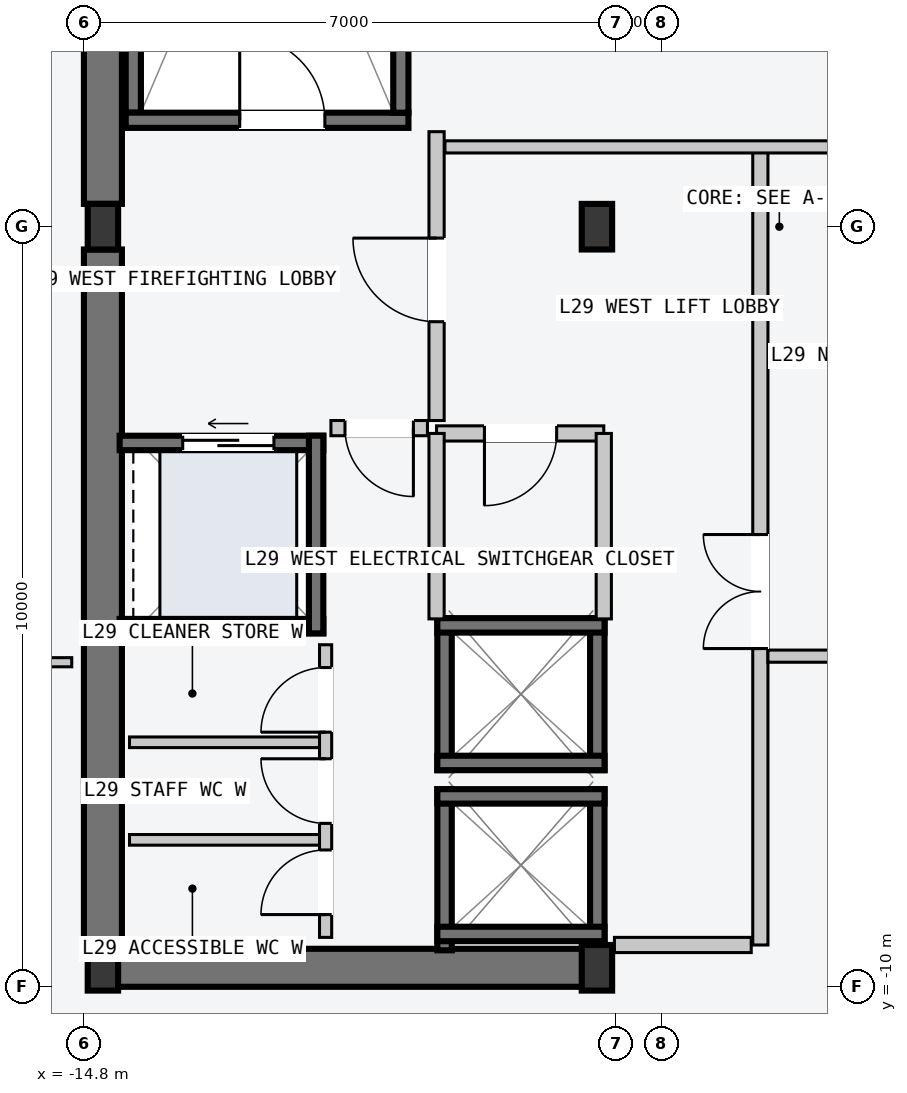
"""IFC4 building model, lengths in metres.
Left out: names, types, materials, properties, quantities, classifications, styles, units other than length and angle.
Written with IfcOpenShell. Run it as: python <this file> out.ifc"""

import sys

from ifc_helpers import new_model, si_unit, direction, frame, frame_2d, origin, origin_2d, place, context, subcontext, project, spatial, rectangle, i_section, extrude, element, fill, save


model = new_model("IFC4")
c1 = context("Model", 3, precision=1e-05, world=origin(), true_north=direction((0.0, 1.0)))
c2 = subcontext(c1, "Body", "Model", "MODEL_VIEW")
j1 = project(units=[si_unit("LENGTHUNIT", "METRE"), si_unit("PLANEANGLEUNIT", "RADIAN")], contexts=[c1])
p1 = place(None, origin())
s1 = spatial("IfcSite", under=j1, at=p1, CompositionType="ELEMENT")
p2 = place(p1, origin())
s2 = spatial("IfcBuilding", under=s1, at=p2, CompositionType="ELEMENT")
p3 = place(p2, frame((0.0, 0.0, 113.4)))
s3 = spatial("IfcBuildingStorey", under=s2, at=p3, CompositionType="ELEMENT", Elevation=113.4)
p4 = place(p3, frame((-14.53, -9.75, -0.2), z_axis=(0.0, 0.0, 1.0), x_axis=(1.0, 0.0, 0.0)))
e1 = element("IfcWall", 1, at=p4, inside=s3, PredefinedType="SHEAR", context=c2, shape_type="SweptSolid", body=[
    extrude(rectangle(XDim=6.46, YDim=0.5, at=frame_2d((3.23, 0.0))), origin(), (0.0, 0.0, 1.0), 3.6),
])
for number, where, z_axis, x_axis in (
    (2, (-14.55, -9.45, -0.2), (0.0, 0.0, 1.0), (0.0, 1.0, 0.0)),
    (3, (-14.55, 0.3, -0.2), (0.0, 0.0, 1.0), (0.0, 1.0, 0.0)),
):
    element("IfcWall", number, at=place(p3, frame(where, z_axis=z_axis, x_axis=x_axis)), inside=s3, PredefinedType="SHEAR", context=c2, shape_type="SweptSolid", body=[
        extrude(rectangle(XDim=9.15, YDim=0.5, at=frame_2d((4.575, 0.0))), origin(), (0.0, 0.0, 1.0), 3.6),
    ])
p5 = place(p3, frame((-14.15, 1.5, -0.2), z_axis=(0.0, 0.0, 1.0), x_axis=(0.0, 1.0, 0.0)))
e4 = element("IfcWall", 4, at=p5, inside=s3, PredefinedType="SOLIDWALL", context=c2, shape_type="SweptSolid", body=[
    extrude(rectangle(XDim=7.8, YDim=0.2, at=frame_2d((3.9, 0.0))), origin(), (0.0, 0.0, 1.0), 3.6),
])
p6 = place(p3, frame((-14.25, 1.4, -0.2), z_axis=(0.0, 0.0, 1.0), x_axis=(1.0, 0.0, 0.0)))
e5 = element("IfcWall", 5, at=p6, inside=s3, PredefinedType="SOLIDWALL", context=c2, shape_type="SweptSolid", body=[
    extrude(rectangle(XDim=3.72, YDim=0.2, at=frame_2d((1.86, 0.0))), origin(), (0.0, 0.0, 1.0), 3.6),
])
p7 = place(p6, frame((1.5, 0.0, 0.2)))
e6 = element("IfcOpeningElement", 6, at=p7, cuts=e5, PredefinedType="OPENING", context=c2, shape_type="SweptSolid", body=[
    extrude(rectangle(XDim=1.12, YDim=2.18, at=frame_2d((0.56, 1.09))), frame((0.0, 0.11, 0.0), z_axis=(0.0, -1.0, 0.0), x_axis=(1.0, 0.0, 0.0)), (0.0, 0.0, 1.0), 0.22),
])
p8 = place(p3, frame((-10.63, 1.5, -0.2), z_axis=(0.0, 0.0, 1.0), x_axis=(0.0, 1.0, 0.0)))
e7 = element("IfcWall", 7, at=p8, inside=s3, PredefinedType="SOLIDWALL", context=c2, shape_type="SweptSolid", body=[
    extrude(rectangle(XDim=7.8, YDim=0.2, at=frame_2d((3.9, 0.0))), origin(), (0.0, 0.0, 1.0), 3.6),
])
for number, where, z_axis, x_axis in (
    (8, (-14.55, -9.75, 0.0), (0.0, 0.0, 1.0), (1.0, 0.0, 0.0)),
    (9, (-14.55, 0.0, 0.0), (0.0, 0.0, 1.0), (1.0, 0.0, 0.0)),
    (10, (-8.05, -9.75, 0.0), (0.0, 0.0, 1.0), (1.0, 0.0, 0.0)),
    (11, (-8.05, 0.0, 0.0), (0.0, 0.0, 1.0), (1.0, 0.0, 0.0)),
):
    element("IfcColumn", number, at=place(p3, frame(where, z_axis=z_axis, x_axis=x_axis)), inside=s3, PredefinedType="COLUMN", context=c2, shape_type="SweptSolid", body=[
        extrude(i_section(OverallWidth=0.4, OverallDepth=0.6, WebThickness=0.022, FlangeThickness=0.036, at=origin_2d()), origin(), (0.0, 0.0, 1.0), 3.6),
    ])
for number, where, z_axis, x_axis in (
    (12, (-8.045, -9.52, -0.2), (0.0, 0.0, 1.0), (0.0, 1.0, 0.0)),
    (13, (-10.055, -9.52, -0.2), (0.0, 0.0, 1.0), (0.0, 1.0, 0.0)),
):
    element("IfcWall", number, at=place(p3, frame(where, z_axis=z_axis, x_axis=x_axis)), inside=s3, PredefinedType="SOLIDWALL", context=c2, shape_type="SweptSolid", body=[
        extrude(rectangle(XDim=2.12, YDim=0.19, at=frame_2d((1.06, 0.0))), origin(), (0.0, 0.0, 1.0), 3.6),
    ])
for number, where, z_axis, x_axis in (
    (14, (-10.15, -7.495, -0.2), (0.0, 0.0, 1.0), (1.0, 0.0, 0.0)),
    (15, (-10.15, -9.305, -0.2), (0.0, 0.0, 1.0), (1.0, 0.0, 0.0)),
):
    element("IfcWall", number, at=place(p3, frame(where, z_axis=z_axis, x_axis=x_axis)), inside=s3, PredefinedType="SOLIDWALL", context=c2, shape_type="SweptSolid", body=[
        extrude(rectangle(XDim=2.2, YDim=0.19, at=frame_2d((1.1, 0.0))), origin(), (0.0, 0.0, 1.0), 3.6),
    ])
for number, where, z_axis, x_axis in (
    (16, (-8.045, -7.15, -0.2), (0.0, 0.0, 1.0), (0.0, 1.0, 0.0)),
    (17, (-10.055, -7.15, -0.2), (0.0, 0.0, 1.0), (0.0, 1.0, 0.0)),
):
    element("IfcWall", number, at=place(p3, frame(where, z_axis=z_axis, x_axis=x_axis)), inside=s3, PredefinedType="SOLIDWALL", context=c2, shape_type="SweptSolid", body=[
        extrude(rectangle(XDim=2.0, YDim=0.19, at=frame_2d((1.0, 0.0))), origin(), (0.0, 0.0, 1.0), 3.6),
    ])
for number, where, z_axis, x_axis in (
    (18, (-10.15, -5.245, -0.2), (0.0, 0.0, 1.0), (1.0, 0.0, 0.0)),
    (19, (-10.15, -7.055, -0.2), (0.0, 0.0, 1.0), (1.0, 0.0, 0.0)),
):
    element("IfcWall", number, at=place(p3, frame(where, z_axis=z_axis, x_axis=x_axis)), inside=s3, PredefinedType="SOLIDWALL", context=c2, shape_type="SweptSolid", body=[
        extrude(rectangle(XDim=2.2, YDim=0.19, at=frame_2d((1.1, 0.0))), origin(), (0.0, 0.0, 1.0), 3.6),
    ])
p9 = place(p3, frame((-14.33, -2.845, -0.2), z_axis=(0.0, 0.0, 1.0), x_axis=(1.0, 0.0, 0.0)))
e20 = element("IfcWall", 20, at=p9, inside=s3, PredefinedType="SOLIDWALL", context=c2, shape_type="SweptSolid", body=[
    extrude(rectangle(XDim=2.68, YDim=0.19, at=frame_2d((1.34, 0.0))), origin(), (0.0, 0.0, 1.0), 3.6),
])
p10 = place(p9, frame((0.83, 0.0, 0.2)))
e21 = element("IfcOpeningElement", 21, at=p10, cuts=e20, PredefinedType="OPENING", context=c2, shape_type="SweptSolid", body=[
    extrude(rectangle(XDim=1.2, YDim=2.2, at=frame_2d((0.6, 1.1))), frame((0.0, 0.105, 0.0), z_axis=(0.0, -1.0, 0.0), x_axis=(1.0, 0.0, 0.0)), (0.0, 0.0, 1.0), 0.21),
])
p11 = place(p3, frame((-14.33, -5.255, -0.2), z_axis=(0.0, 0.0, 1.0), x_axis=(1.0, 0.0, 0.0)))
e22 = element("IfcWall", 22, at=p11, inside=s3, PredefinedType="SOLIDWALL", context=c2, shape_type="SweptSolid", body=[
    extrude(rectangle(XDim=2.68, YDim=0.19, at=frame_2d((1.34, 0.0))), origin(), (0.0, 0.0, 1.0), 3.6),
])
p12 = place(p3, frame((-11.745, -5.35, -0.2), z_axis=(0.0, 0.0, 1.0), x_axis=(0.0, 1.0, 0.0)))
e23 = element("IfcWall", 23, at=p12, inside=s3, PredefinedType="SOLIDWALL", context=c2, shape_type="SweptSolid", body=[
    extrude(rectangle(XDim=2.6, YDim=0.19, at=frame_2d((1.3, 0.0))), origin(), (0.0, 0.0, 1.0), 3.6),
])
p13 = place(p3, frame((-5.9, -9.45, 0.0), z_axis=(0.0, 0.0, 1.0), x_axis=(0.0, 1.0, 0.0)))
e24 = element("IfcWall", 24, at=p13, inside=s3, PredefinedType="PARTITIONING", context=c2, shape_type="SweptSolid", body=[
    extrude(rectangle(XDim=10.5, YDim=0.2, at=frame_2d((5.25, 0.0))), origin(), (0.0, 0.0, 1.0), 3.4),
])
p14 = place(p13, frame((3.9, 0.0, 0.0)))
e25 = element("IfcOpeningElement", 25, at=p14, cuts=e24, PredefinedType="OPENING", context=c2, shape_type="SweptSolid", body=[
    extrude(rectangle(XDim=1.5, YDim=2.2, at=frame_2d((0.75, 1.1))), frame((0.0, 0.11, 0.0), z_axis=(0.0, -1.0, 0.0), x_axis=(1.0, 0.0, 0.0)), (0.0, 0.0, 1.0), 0.22),
])
p15 = place(p3, frame((-6.02, -9.45, 0.0), z_axis=(0.0, 0.0, 1.0), x_axis=(-1.0, 0.0, 0.0)))
e26 = element("IfcWall", 26, at=p15, inside=s3, PredefinedType="PARTITIONING", context=c2, shape_type="SweptSolid", body=[
    extrude(rectangle(XDim=1.8, YDim=0.2, at=frame_2d((0.9, 0.0))), origin(), (0.0, 0.0, 1.0), 3.4),
])
p16 = place(p3, frame((-10.16, -2.55, 0.0), z_axis=(0.0, 0.0, 1.0), x_axis=(0.0, 1.0, 0.0)))
e27 = element("IfcWall", 27, at=p16, inside=s3, PredefinedType="PARTITIONING", context=c2, shape_type="SweptSolid", body=[
    extrude(rectangle(XDim=3.8, YDim=0.2, at=frame_2d((1.9, 0.0))), origin(), (0.0, 0.0, 1.0), 3.4),
])
p17 = place(p16, frame((1.3, 0.0, 0.0)))
e28 = element("IfcOpeningElement", 28, at=p17, cuts=e27, PredefinedType="OPENING", context=c2, shape_type="SweptSolid", body=[
    extrude(rectangle(XDim=1.1, YDim=2.15, at=frame_2d((0.55, 1.075))), frame((0.0, 0.11, 0.0), z_axis=(0.0, -1.0, 0.0), x_axis=(1.0, 0.0, 0.0)), (0.0, 0.0, 1.0), 0.22),
])
p18 = place(p3, frame((-10.28, -2.65, 0.0), z_axis=(0.0, 0.0, 1.0), x_axis=(-1.0, 0.0, 0.0)))
e29 = element("IfcWall", 29, at=p18, inside=s3, PredefinedType="PARTITIONING", context=c2, shape_type="SweptSolid", body=[
    extrude(rectangle(XDim=1.27, YDim=0.2, at=frame_2d((0.635, 0.0))), origin(), (0.0, 0.0, 1.0), 3.4),
])
p19 = place(p18, frame((0.185, 0.0, 0.0)))
e30 = element("IfcOpeningElement", 30, at=p19, cuts=e29, PredefinedType="OPENING", context=c2, shape_type="SweptSolid", body=[
    extrude(rectangle(XDim=0.9, YDim=2.15, at=frame_2d((0.45, 1.075))), frame((0.0, 0.11, 0.0), z_axis=(0.0, -1.0, 0.0), x_axis=(1.0, 0.0, 0.0)), (0.0, 0.0, 1.0), 0.22),
])
p20 = place(p3, frame((-7.96, -2.72, 0.0), z_axis=(0.0, 0.0, 1.0), x_axis=(-1.0, 0.0, 0.0)))
e31 = element("IfcWall", 31, at=p20, inside=s3, PredefinedType="PARTITIONING", context=c2, shape_type="SweptSolid", body=[
    extrude(rectangle(XDim=2.2, YDim=0.2, at=frame_2d((1.1, 0.0))), origin(), (0.0, 0.0, 1.0), 3.4),
])
p21 = place(p20, frame((0.62, 0.0, 0.0)))
e32 = element("IfcOpeningElement", 32, at=p21, cuts=e31, PredefinedType="OPENING", context=c2, shape_type="SweptSolid", body=[
    extrude(rectangle(XDim=0.95, YDim=2.1, at=frame_2d((0.475, 1.05))), frame((0.0, 0.11, 0.0), z_axis=(0.0, -1.0, 0.0), x_axis=(1.0, 0.0, 0.0)), (0.0, 0.0, 1.0), 0.22),
])
for number, where, z_axis, x_axis in (
    (33, (-7.96, -5.16, 0.0), (0.0, 0.0, 1.0), (0.0, 1.0, 0.0)),
    (34, (-10.16, -5.16, 0.0), (0.0, 0.0, 1.0), (0.0, 1.0, 0.0)),
):
    element("IfcWall", number, at=place(p3, frame(where, z_axis=z_axis, x_axis=x_axis)), inside=s3, PredefinedType="PARTITIONING", context=c2, shape_type="SweptSolid", body=[
        extrude(rectangle(XDim=2.44, YDim=0.2, at=frame_2d((1.22, 0.0))), origin(), (0.0, 0.0, 1.0), 3.4),
    ])
for number, where, z_axis, x_axis in (
    (35, (-11.7, -8.067, 0.0), (0.0, 0.0, 1.0), (-1.0, 0.0, 0.0)),
    (36, (-11.7, -6.783, 0.0), (0.0, 0.0, 1.0), (-1.0, 0.0, 0.0)),
):
    element("IfcWall", number, at=place(p3, frame(where, z_axis=z_axis, x_axis=x_axis)), inside=s3, PredefinedType="PARTITIONING", context=c2, shape_type="SweptSolid", body=[
        extrude(rectangle(XDim=2.5, YDim=0.14, at=frame_2d((1.25, 0.0))), origin(), (0.0, 0.0, 1.0), 3.4),
    ])
p22 = place(p3, frame((-11.62, -9.35, 0.0), z_axis=(0.0, 0.0, 1.0), x_axis=(0.0, 1.0, 0.0)))
e37 = element("IfcWall", 37, at=p22, inside=s3, PredefinedType="PARTITIONING", context=c2, shape_type="SweptSolid", body=[
    extrude(rectangle(XDim=3.85, YDim=0.16, at=frame_2d((1.925, 0.0))), origin(), (0.0, 0.0, 1.0), 3.4),
])
p23 = place(p22, frame((0.3, 0.0, 0.0)))
e38 = element("IfcOpeningElement", 38, at=p23, cuts=e37, PredefinedType="OPENING", context=c2, shape_type="SweptSolid", body=[
    extrude(rectangle(XDim=0.85, YDim=2.12, at=frame_2d((0.425, 1.06))), frame((0.0, 0.09, 0.0), z_axis=(0.0, -1.0, 0.0), x_axis=(1.0, 0.0, 0.0)), (0.0, 0.0, 1.0), 0.18),
])
p24 = place(p22, frame((1.5, 0.0, 0.0)))
e39 = element("IfcOpeningElement", 39, at=p24, cuts=e37, PredefinedType="OPENING", context=c2, shape_type="SweptSolid", body=[
    extrude(rectangle(XDim=0.85, YDim=2.12, at=frame_2d((0.425, 1.06))), frame((0.0, 0.09, 0.0), z_axis=(0.0, -1.0, 0.0), x_axis=(1.0, 0.0, 0.0)), (0.0, 0.0, 1.0), 0.18),
])
p25 = place(p22, frame((2.7, 0.0, 0.0)))
e40 = element("IfcOpeningElement", 40, at=p25, cuts=e37, PredefinedType="OPENING", context=c2, shape_type="SweptSolid", body=[
    extrude(rectangle(XDim=0.85, YDim=2.12, at=frame_2d((0.425, 1.06))), frame((0.0, 0.09, 0.0), z_axis=(0.0, -1.0, 0.0), x_axis=(1.0, 0.0, 0.0)), (0.0, 0.0, 1.0), 0.18),
])
p26 = place(p3, frame((-10.05, 1.05, 0.0), z_axis=(0.0, 0.0, 1.0), x_axis=(1.0, 0.0, 0.0)))
e41 = element("IfcWall", 41, at=p26, inside=s3, PredefinedType="PARTITIONING", context=c2, shape_type="SweptSolid", body=[
    extrude(rectangle(XDim=6.21, YDim=0.16, at=frame_2d((3.105, 0.0))), origin(), (0.0, 0.0, 1.0), 3.4),
])
p27 = place(p3, frame((-5.8, -5.65, 0.0), z_axis=(0.0, 0.0, 1.0), x_axis=(1.0, 0.0, 0.0)))
e42 = element("IfcWall", 42, at=p27, inside=s3, PredefinedType="PARTITIONING", context=c2, shape_type="SweptSolid", body=[
    extrude(rectangle(XDim=11.6, YDim=0.16, at=frame_2d((5.8, 0.0))), origin(), (0.0, 0.0, 1.0), 3.4),
])
p28 = place(p27, frame((5.1, 0.0, 0.0)))
e43 = element("IfcOpeningElement", 43, at=p28, cuts=e42, PredefinedType="OPENING", context=c2, shape_type="SweptSolid", body=[
    extrude(rectangle(XDim=1.4, YDim=2.2, at=frame_2d((0.7, 1.1))), frame((0.0, 0.09, 0.0), z_axis=(0.0, -1.0, 0.0), x_axis=(1.0, 0.0, 0.0)), (0.0, 0.0, 1.0), 0.18),
])
p29 = place(p3, frame((-22.56, -5.73, 0.0), z_axis=(0.0, 0.0, 1.0), x_axis=(1.0, 0.0, 0.0)))
e44 = element("IfcWall", 44, at=p29, inside=s3, PredefinedType="PARTITIONING", context=c2, shape_type="SweptSolid", body=[
    extrude(rectangle(XDim=7.6, YDim=0.12, at=frame_2d((3.8, 0.0))), origin(), (0.0, 0.0, 1.0), 3.4),
])
p30 = place(p29, frame((0.9, 0.0, 0.0)))
e45 = element("IfcOpeningElement", 45, at=p30, cuts=e44, PredefinedType="OPENING", context=c2, shape_type="SweptSolid", body=[
    extrude(rectangle(XDim=0.96, YDim=2.18, at=frame_2d((0.48, 1.09))), frame((0.0, 0.07, 0.0), z_axis=(0.0, -1.0, 0.0), x_axis=(1.0, 0.0, 0.0)), (0.0, 0.0, 1.0), 0.14),
])
p31 = place(p7, origin())
e46 = element("IfcDoor", 46, at=p31, inside=s3, OperationType="SINGLE_SWING_LEFT", PredefinedType="DOOR", context=c2, shape_type="SweptSolid", body=[
    extrude(rectangle(XDim=1.12, YDim=2.18, at=frame_2d((0.56, 1.09))), frame((0.0, 0.025, 0.0), z_axis=(0.0, -1.0, 0.0), x_axis=(1.0, 0.0, 0.0)), (0.0, 0.0, 1.0), 0.05),
])
fill(e6, e46)
p32 = place(p10, origin())
e47 = element("IfcDoor", 47, at=p32, inside=s3, OperationType="SLIDING_TO_LEFT", PredefinedType="DOOR", context=c2, shape_type="SweptSolid", body=[
    extrude(rectangle(XDim=1.2, YDim=2.2, at=frame_2d((0.6, 1.1))), frame((0.0, 0.025, 0.0), z_axis=(0.0, -1.0, 0.0), x_axis=(1.0, 0.0, 0.0)), (0.0, 0.0, 1.0), 0.05),
])
fill(e21, e47)
p33 = place(p14, origin())
e48 = element("IfcDoor", 48, at=p33, inside=s3, OperationType="DOUBLE_DOOR_SINGLE_SWING", PredefinedType="DOOR", context=c2, shape_type="SweptSolid", body=[
    extrude(rectangle(XDim=1.5, YDim=2.2, at=frame_2d((0.75, 1.1))), frame((0.0, 0.025, 0.0), z_axis=(0.0, -1.0, 0.0), x_axis=(1.0, 0.0, 0.0)), (0.0, 0.0, 1.0), 0.05),
])
fill(e25, e48)
p34 = place(p17, origin())
e49 = element("IfcDoor", 49, at=p34, inside=s3, OperationType="SINGLE_SWING_RIGHT", PredefinedType="DOOR", context=c2, shape_type="SweptSolid", body=[
    extrude(rectangle(XDim=1.1, YDim=2.15, at=frame_2d((0.55, 1.075))), frame((0.0, 0.025, 0.0), z_axis=(0.0, -1.0, 0.0), x_axis=(1.0, 0.0, 0.0)), (0.0, 0.0, 1.0), 0.05),
])
fill(e28, e49)
p35 = place(p19, origin())
e50 = element("IfcDoor", 50, at=p35, inside=s3, OperationType="SINGLE_SWING_LEFT", PredefinedType="DOOR", context=c2, shape_type="SweptSolid", body=[
    extrude(rectangle(XDim=0.9, YDim=2.15, at=frame_2d((0.45, 1.075))), frame((0.0, 0.025, 0.0), z_axis=(0.0, -1.0, 0.0), x_axis=(1.0, 0.0, 0.0)), (0.0, 0.0, 1.0), 0.05),
])
fill(e30, e50)
p36 = place(p21, origin())
e51 = element("IfcDoor", 51, at=p36, inside=s3, OperationType="SINGLE_SWING_RIGHT", PredefinedType="DOOR", context=c2, shape_type="SweptSolid", body=[
    extrude(rectangle(XDim=0.95, YDim=2.1, at=frame_2d((0.475, 1.05))), frame((0.0, 0.025, 0.0), z_axis=(0.0, -1.0, 0.0), x_axis=(1.0, 0.0, 0.0)), (0.0, 0.0, 1.0), 0.05),
])
fill(e32, e51)
p37 = place(p23, origin())
e52 = element("IfcDoor", 52, at=p37, inside=s3, OperationType="SINGLE_SWING_LEFT", PredefinedType="DOOR", context=c2, shape_type="SweptSolid", body=[
    extrude(rectangle(XDim=0.85, YDim=2.12, at=frame_2d((0.425, 1.06))), frame((0.0, 0.025, 0.0), z_axis=(0.0, -1.0, 0.0), x_axis=(1.0, 0.0, 0.0)), (0.0, 0.0, 1.0), 0.05),
])
fill(e38, e52)
p38 = place(p24, origin())
e53 = element("IfcDoor", 53, at=p38, inside=s3, OperationType="SINGLE_SWING_RIGHT", PredefinedType="DOOR", context=c2, shape_type="SweptSolid", body=[
    extrude(rectangle(XDim=0.85, YDim=2.12, at=frame_2d((0.425, 1.06))), frame((0.0, 0.025, 0.0), z_axis=(0.0, -1.0, 0.0), x_axis=(1.0, 0.0, 0.0)), (0.0, 0.0, 1.0), 0.05),
])
fill(e39, e53)
p39 = place(p25, origin())
e54 = element("IfcDoor", 54, at=p39, inside=s3, OperationType="SINGLE_SWING_LEFT", PredefinedType="DOOR", context=c2, shape_type="SweptSolid", body=[
    extrude(rectangle(XDim=0.85, YDim=2.12, at=frame_2d((0.425, 1.06))), frame((0.0, 0.025, 0.0), z_axis=(0.0, -1.0, 0.0), x_axis=(1.0, 0.0, 0.0)), (0.0, 0.0, 1.0), 0.05),
])
fill(e40, e54)
save(model, sys.argv[1])
